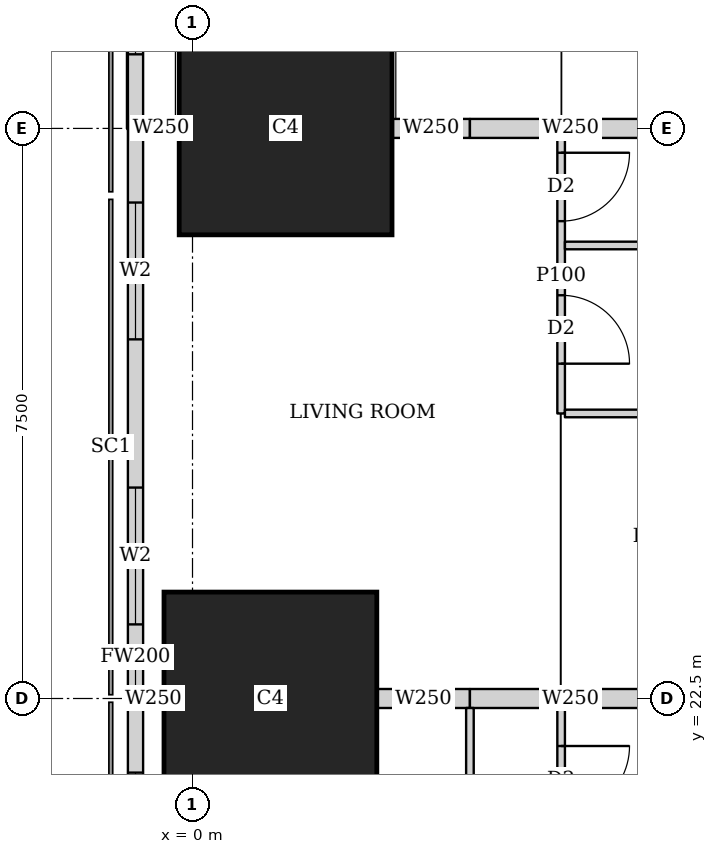
"""IFC4 building model, lengths in metres.
Left out: names, types, materials, properties, quantities, classifications, styles, units other than length and angle.
Written with IfcOpenShell. Run it as: python <this file> out.ifc"""

import sys

from ifc_helpers import new_model, si_unit, direction, frame, frame_2d, origin, origin_2d, place, context, subcontext, project, spatial, rectangle, extrude, element, fill, save


model = new_model("IFC4")
c1 = context("Model", 3, precision=1e-05, world=origin(), true_north=direction((0.0, 1.0)))
c2 = subcontext(c1, "Body", "Model", "MODEL_VIEW")
j1 = project(units=[si_unit("LENGTHUNIT", "METRE"), si_unit("PLANEANGLEUNIT", "RADIAN")], contexts=[c1])
p1 = place(None, origin())
s1 = spatial("IfcSite", under=j1, at=p1, CompositionType="ELEMENT")
p2 = place(p1, origin())
s2 = spatial("IfcBuilding", under=s1, at=p2, CompositionType="ELEMENT")
p3 = place(p2, frame((0.0, 0.0, 53.75)))
s3 = spatial("IfcBuildingStorey", under=s2, at=p3, CompositionType="ELEMENT", Elevation=53.75)
for number, where, z_axis, x_axis in (
    (1, (1.025, 22.5, 0.0), (0.0, 0.0, 1.0), (1.0, 0.0, 0.0)),
    (2, (1.225, 30.0, 0.0), (0.0, 0.0, 1.0), (1.0, 0.0, 0.0)),
):
    element("IfcColumn", number, at=place(p3, frame(where, z_axis=z_axis, x_axis=x_axis)), inside=s3, PredefinedType="COLUMN", context=c2, shape_type="SweptSolid", body=[
        extrude(rectangle(XDim=2.8, YDim=2.8, at=origin_2d()), origin(), (0.0, 0.0, 1.0), 3.75),
    ])
p4 = place(p3, frame((-0.75, 42.837, 0.0), z_axis=(0.0, 0.0, 1.0), x_axis=(0.0, -1.0, 0.0)))
e3 = element("IfcWall", 3, at=p4, inside=s3, PredefinedType="SOLIDWALL", context=c2, shape_type="SweptSolid", body=[
    extrude(rectangle(XDim=40.674, YDim=0.2, at=frame_2d((20.337, 0.0))), origin(), (0.0, 0.0, 1.0), 3.5),
])
p5 = place(p4, frame((1.78, 0.0, 0.9)))
e4 = element("IfcOpeningElement", 4, at=p5, cuts=e3, PredefinedType="OPENING", context=c2, shape_type="SweptSolid", body=[
    extrude(rectangle(XDim=1.8, YDim=1.5, at=frame_2d((0.9, 0.75))), frame((0.0, 0.11, 0.0), z_axis=(0.0, -1.0, 0.0), x_axis=(1.0, 0.0, 0.0)), (0.0, 0.0, 1.0), 0.22),
])
p6 = place(p4, frame((6.312, 0.0, 0.9)))
e5 = element("IfcOpeningElement", 5, at=p6, cuts=e3, PredefinedType="OPENING", context=c2, shape_type="SweptSolid", body=[
    extrude(rectangle(XDim=1.8, YDim=1.5, at=frame_2d((0.9, 0.75))), frame((0.0, 0.11, 0.0), z_axis=(0.0, -1.0, 0.0), x_axis=(1.0, 0.0, 0.0)), (0.0, 0.0, 1.0), 0.22),
])
p7 = place(p4, frame((10.062, 0.0, 0.9)))
e6 = element("IfcOpeningElement", 6, at=p7, cuts=e3, PredefinedType="OPENING", context=c2, shape_type="SweptSolid", body=[
    extrude(rectangle(XDim=1.8, YDim=1.5, at=frame_2d((0.9, 0.75))), frame((0.0, 0.11, 0.0), z_axis=(0.0, -1.0, 0.0), x_axis=(1.0, 0.0, 0.0)), (0.0, 0.0, 1.0), 0.22),
])
p8 = place(p4, frame((13.812, 0.0, 0.9)))
e7 = element("IfcOpeningElement", 7, at=p8, cuts=e3, PredefinedType="OPENING", context=c2, shape_type="SweptSolid", body=[
    extrude(rectangle(XDim=1.8, YDim=1.5, at=frame_2d((0.9, 0.75))), frame((0.0, 0.11, 0.0), z_axis=(0.0, -1.0, 0.0), x_axis=(1.0, 0.0, 0.0)), (0.0, 0.0, 1.0), 0.22),
])
p9 = place(p4, frame((17.562, 0.0, 0.9)))
e8 = element("IfcOpeningElement", 8, at=p9, cuts=e3, PredefinedType="OPENING", context=c2, shape_type="SweptSolid", body=[
    extrude(rectangle(XDim=1.8, YDim=1.5, at=frame_2d((0.9, 0.75))), frame((0.0, 0.11, 0.0), z_axis=(0.0, -1.0, 0.0), x_axis=(1.0, 0.0, 0.0)), (0.0, 0.0, 1.0), 0.22),
])
p10 = place(p4, frame((21.312, 0.0, 0.9)))
e9 = element("IfcOpeningElement", 9, at=p10, cuts=e3, PredefinedType="OPENING", context=c2, shape_type="SweptSolid", body=[
    extrude(rectangle(XDim=1.8, YDim=1.5, at=frame_2d((0.9, 0.75))), frame((0.0, 0.11, 0.0), z_axis=(0.0, -1.0, 0.0), x_axis=(1.0, 0.0, 0.0)), (0.0, 0.0, 1.0), 0.22),
])
p11 = place(p4, frame((25.062, 0.0, 0.9)))
e10 = element("IfcOpeningElement", 10, at=p11, cuts=e3, PredefinedType="OPENING", context=c2, shape_type="SweptSolid", body=[
    extrude(rectangle(XDim=1.8, YDim=1.5, at=frame_2d((0.9, 0.75))), frame((0.0, 0.11, 0.0), z_axis=(0.0, -1.0, 0.0), x_axis=(1.0, 0.0, 0.0)), (0.0, 0.0, 1.0), 0.22),
])
p12 = place(p4, frame((28.812, 0.0, 0.9)))
e11 = element("IfcOpeningElement", 11, at=p12, cuts=e3, PredefinedType="OPENING", context=c2, shape_type="SweptSolid", body=[
    extrude(rectangle(XDim=1.8, YDim=1.5, at=frame_2d((0.9, 0.75))), frame((0.0, 0.11, 0.0), z_axis=(0.0, -1.0, 0.0), x_axis=(1.0, 0.0, 0.0)), (0.0, 0.0, 1.0), 0.22),
])
p13 = place(p4, frame((32.562, 0.0, 0.9)))
e12 = element("IfcOpeningElement", 12, at=p13, cuts=e3, PredefinedType="OPENING", context=c2, shape_type="SweptSolid", body=[
    extrude(rectangle(XDim=1.8, YDim=1.5, at=frame_2d((0.9, 0.75))), frame((0.0, 0.11, 0.0), z_axis=(0.0, -1.0, 0.0), x_axis=(1.0, 0.0, 0.0)), (0.0, 0.0, 1.0), 0.22),
])
p14 = place(p4, frame((37.094, 0.0, 0.9)))
e13 = element("IfcOpeningElement", 13, at=p14, cuts=e3, PredefinedType="OPENING", context=c2, shape_type="SweptSolid", body=[
    extrude(rectangle(XDim=1.8, YDim=1.5, at=frame_2d((0.9, 0.75))), frame((0.0, 0.11, 0.0), z_axis=(0.0, -1.0, 0.0), x_axis=(1.0, 0.0, 0.0)), (0.0, 0.0, 1.0), 0.22),
])
p15 = place(p3, frame((3.65, 15.0, 0.0), z_axis=(0.0, 0.0, 1.0), x_axis=(0.0, 1.0, 0.0)))
e14 = element("IfcWall", 14, at=p15, inside=s3, PredefinedType="PARTITIONING", context=c2, shape_type="SweptSolid", body=[
    extrude(rectangle(XDim=7.375, YDim=0.1, at=frame_2d((3.688, 0.0))), origin(), (0.0, 0.0, 1.0), 3.5),
])
p16 = place(p15, frame((1.45, 0.0, 0.0)))
e15 = element("IfcOpeningElement", 15, at=p16, cuts=e14, PredefinedType="OPENING", context=c2, shape_type="SweptSolid", body=[
    extrude(rectangle(XDim=0.9, YDim=2.1, at=frame_2d((0.45, 1.05))), frame((0.0, 0.06, 0.0), z_axis=(0.0, -1.0, 0.0), x_axis=(1.0, 0.0, 0.0)), (0.0, 0.0, 1.0), 0.12),
])
p17 = place(p15, frame((3.95, 0.0, 0.0)))
e16 = element("IfcOpeningElement", 16, at=p17, cuts=e14, PredefinedType="OPENING", context=c2, shape_type="SweptSolid", body=[
    extrude(rectangle(XDim=0.9, YDim=2.1, at=frame_2d((0.45, 1.05))), frame((0.0, 0.06, 0.0), z_axis=(0.0, -1.0, 0.0), x_axis=(1.0, 0.0, 0.0)), (0.0, 0.0, 1.0), 0.12),
])
p18 = place(p3, frame((4.85, 15.0, 0.0), z_axis=(0.0, 0.0, 1.0), x_axis=(0.0, 1.0, 0.0)))
e17 = element("IfcWall", 17, at=p18, inside=s3, PredefinedType="PARTITIONING", context=c2, shape_type="SweptSolid", body=[
    extrude(rectangle(XDim=7.375, YDim=0.1, at=frame_2d((3.688, 0.0))), origin(), (0.0, 0.0, 1.0), 3.5),
])
p19 = place(p18, frame((0.655, 0.0, 0.0)))
e18 = element("IfcOpeningElement", 18, at=p19, cuts=e17, PredefinedType="OPENING", context=c2, shape_type="SweptSolid", body=[
    extrude(rectangle(XDim=0.9, YDim=2.1, at=frame_2d((0.45, 1.05))), frame((0.0, 0.06, 0.0), z_axis=(0.0, -1.0, 0.0), x_axis=(1.0, 0.0, 0.0)), (0.0, 0.0, 1.0), 0.12),
])
p20 = place(p18, frame((4.1, 0.0, 0.0)))
e19 = element("IfcOpeningElement", 19, at=p20, cuts=e17, PredefinedType="OPENING", context=c2, shape_type="SweptSolid", body=[
    extrude(rectangle(XDim=0.9, YDim=2.1, at=frame_2d((0.45, 1.05))), frame((0.0, 0.06, 0.0), z_axis=(0.0, -1.0, 0.0), x_axis=(1.0, 0.0, 0.0)), (0.0, 0.0, 1.0), 0.12),
])
p21 = place(p18, frame((2.53, 0.0, 0.0)))
e20 = element("IfcOpeningElement", 20, at=p21, cuts=e17, PredefinedType="OPENING", context=c2, shape_type="SweptSolid", body=[
    extrude(rectangle(XDim=0.9, YDim=2.1, at=frame_2d((0.45, 1.05))), frame((0.0, 0.06, 0.0), z_axis=(0.0, -1.0, 0.0), x_axis=(1.0, 0.0, 0.0)), (0.0, 0.0, 1.0), 0.12),
])
p22 = place(p18, frame((5.975, 0.0, 0.0)))
e21 = element("IfcOpeningElement", 21, at=p22, cuts=e17, PredefinedType="OPENING", context=c2, shape_type="SweptSolid", body=[
    extrude(rectangle(XDim=0.9, YDim=2.1, at=frame_2d((0.45, 1.05))), frame((0.0, 0.06, 0.0), z_axis=(0.0, -1.0, 0.0), x_axis=(1.0, 0.0, 0.0)), (0.0, 0.0, 1.0), 0.12),
])
p23 = place(p3, frame((4.85, 26.25, 0.0), z_axis=(0.0, 0.0, 1.0), x_axis=(0.0, 1.0, 0.0)))
e22 = element("IfcWall", 22, at=p23, inside=s3, PredefinedType="PARTITIONING", context=c2, shape_type="SweptSolid", body=[
    extrude(rectangle(XDim=3.625, YDim=0.1, at=frame_2d((1.812, 0.0))), origin(), (0.0, 0.0, 1.0), 3.5),
])
p24 = place(p23, frame((0.655, 0.0, 0.0)))
e23 = element("IfcOpeningElement", 23, at=p24, cuts=e22, PredefinedType="OPENING", context=c2, shape_type="SweptSolid", body=[
    extrude(rectangle(XDim=0.9, YDim=2.1, at=frame_2d((0.45, 1.05))), frame((0.0, 0.06, 0.0), z_axis=(0.0, -1.0, 0.0), x_axis=(1.0, 0.0, 0.0)), (0.0, 0.0, 1.0), 0.12),
])
p25 = place(p23, frame((2.53, 0.0, 0.0)))
e24 = element("IfcOpeningElement", 24, at=p25, cuts=e22, PredefinedType="OPENING", context=c2, shape_type="SweptSolid", body=[
    extrude(rectangle(XDim=0.9, YDim=2.1, at=frame_2d((0.45, 1.05))), frame((0.0, 0.06, 0.0), z_axis=(0.0, -1.0, 0.0), x_axis=(1.0, 0.0, 0.0)), (0.0, 0.0, 1.0), 0.12),
])
for number, where, z_axis, x_axis in (
    (25, (4.9, 26.25, 0.0), (0.0, 0.0, 1.0), (1.0, 0.0, 0.0)),
    (26, (4.9, 28.46, 0.0), (0.0, 0.0, 1.0), (1.0, 0.0, 0.0)),
):
    element("IfcWall", number, at=place(p3, frame(where, z_axis=z_axis, x_axis=x_axis)), inside=s3, PredefinedType="PARTITIONING", context=c2, shape_type="SweptSolid", body=[
        extrude(rectangle(XDim=3.275, YDim=0.1, at=frame_2d((1.638, 0.0))), origin(), (0.0, 0.0, 1.0), 3.5),
    ])
p26 = place(p3, frame((-0.65, 22.5, 0.0), z_axis=(0.0, 0.0, 1.0), x_axis=(1.0, 0.0, 0.0)))
e27 = element("IfcWall", 27, at=p26, inside=s3, PredefinedType="SOLIDWALL", context=c2, shape_type="SweptSolid", body=[
    extrude(rectangle(XDim=0.274, YDim=0.25, at=frame_2d((0.137, 0.0))), origin(), (0.0, 0.0, 1.0), 3.5),
])
p27 = place(p3, frame((2.426, 22.5, 0.0), z_axis=(0.0, 0.0, 1.0), x_axis=(1.0, 0.0, 0.0)))
e28 = element("IfcWall", 28, at=p27, inside=s3, PredefinedType="SOLIDWALL", context=c2, shape_type="SweptSolid", body=[
    extrude(rectangle(XDim=1.224, YDim=0.25, at=frame_2d((0.612, 0.0))), origin(), (0.0, 0.0, 1.0), 3.5),
])
p28 = place(p3, frame((3.65, 22.5, 0.0), z_axis=(0.0, 0.0, 1.0), x_axis=(1.0, 0.0, 0.0)))
e29 = element("IfcWall", 29, at=p28, inside=s3, PredefinedType="SOLIDWALL", context=c2, shape_type="SweptSolid", body=[
    extrude(rectangle(XDim=2.649, YDim=0.25, at=frame_2d((1.325, 0.0))), origin(), (0.0, 0.0, 1.0), 3.5),
])
p29 = place(p3, frame((-0.65, 30.0, 0.0), z_axis=(0.0, 0.0, 1.0), x_axis=(1.0, 0.0, 0.0)))
e30 = element("IfcWall", 30, at=p29, inside=s3, PredefinedType="SOLIDWALL", context=c2, shape_type="SweptSolid", body=[
    extrude(rectangle(XDim=0.474, YDim=0.25, at=frame_2d((0.237, 0.0))), origin(), (0.0, 0.0, 1.0), 3.5),
])
p30 = place(p3, frame((2.626, 30.0, 0.0), z_axis=(0.0, 0.0, 1.0), x_axis=(1.0, 0.0, 0.0)))
e31 = element("IfcWall", 31, at=p30, inside=s3, PredefinedType="SOLIDWALL", context=c2, shape_type="SweptSolid", body=[
    extrude(rectangle(XDim=1.024, YDim=0.25, at=frame_2d((0.512, 0.0))), origin(), (0.0, 0.0, 1.0), 3.5),
])
p31 = place(p3, frame((3.65, 30.0, 0.0), z_axis=(0.0, 0.0, 1.0), x_axis=(1.0, 0.0, 0.0)))
e32 = element("IfcWall", 32, at=p31, inside=s3, PredefinedType="SOLIDWALL", context=c2, shape_type="SweptSolid", body=[
    extrude(rectangle(XDim=2.649, YDim=0.25, at=frame_2d((1.325, 0.0))), origin(), (0.0, 0.0, 1.0), 3.5),
])
p32 = place(p7, origin())
e33 = element("IfcWindow", 33, at=p32, inside=s3, PartitioningType="SINGLE_PANEL", PredefinedType="WINDOW", context=c2, shape_type="SweptSolid", body=[
    extrude(rectangle(XDim=1.8, YDim=1.5, at=frame_2d((0.9, 0.75))), frame((0.0, 0.03, 0.0), z_axis=(0.0, -1.0, 0.0), x_axis=(1.0, 0.0, 0.0)), (0.0, 0.0, 1.0), 0.06),
])
fill(e6, e33)
p33 = place(p8, origin())
e34 = element("IfcWindow", 34, at=p33, inside=s3, PartitioningType="SINGLE_PANEL", PredefinedType="WINDOW", context=c2, shape_type="SweptSolid", body=[
    extrude(rectangle(XDim=1.8, YDim=1.5, at=frame_2d((0.9, 0.75))), frame((0.0, 0.03, 0.0), z_axis=(0.0, -1.0, 0.0), x_axis=(1.0, 0.0, 0.0)), (0.0, 0.0, 1.0), 0.06),
])
fill(e7, e34)
p34 = place(p9, origin())
e35 = element("IfcWindow", 35, at=p34, inside=s3, PartitioningType="SINGLE_PANEL", PredefinedType="WINDOW", context=c2, shape_type="SweptSolid", body=[
    extrude(rectangle(XDim=1.8, YDim=1.5, at=frame_2d((0.9, 0.75))), frame((0.0, 0.03, 0.0), z_axis=(0.0, -1.0, 0.0), x_axis=(1.0, 0.0, 0.0)), (0.0, 0.0, 1.0), 0.06),
])
fill(e8, e35)
p35 = place(p10, origin())
e36 = element("IfcWindow", 36, at=p35, inside=s3, PartitioningType="SINGLE_PANEL", PredefinedType="WINDOW", context=c2, shape_type="SweptSolid", body=[
    extrude(rectangle(XDim=1.8, YDim=1.5, at=frame_2d((0.9, 0.75))), frame((0.0, 0.03, 0.0), z_axis=(0.0, -1.0, 0.0), x_axis=(1.0, 0.0, 0.0)), (0.0, 0.0, 1.0), 0.06),
])
fill(e9, e36)
p36 = place(p22, origin())
e37 = element("IfcDoor", 37, at=p36, inside=s3, OperationType="SINGLE_SWING_LEFT", PredefinedType="DOOR", context=c2, shape_type="SweptSolid", body=[
    extrude(rectangle(XDim=0.9, YDim=2.1, at=frame_2d((0.45, 1.05))), frame((0.0, 0.025, 0.0), z_axis=(0.0, -1.0, 0.0), x_axis=(1.0, 0.0, 0.0)), (0.0, 0.0, 1.0), 0.05),
])
fill(e21, e37)
p37 = place(p24, origin())
e38 = element("IfcDoor", 38, at=p37, inside=s3, OperationType="SINGLE_SWING_RIGHT", PredefinedType="DOOR", context=c2, shape_type="SweptSolid", body=[
    extrude(rectangle(XDim=0.9, YDim=2.1, at=frame_2d((0.45, 1.05))), frame((0.0, 0.025, 0.0), z_axis=(0.0, -1.0, 0.0), x_axis=(1.0, 0.0, 0.0)), (0.0, 0.0, 1.0), 0.05),
])
fill(e23, e38)
p38 = place(p25, origin())
e39 = element("IfcDoor", 39, at=p38, inside=s3, OperationType="SINGLE_SWING_LEFT", PredefinedType="DOOR", context=c2, shape_type="SweptSolid", body=[
    extrude(rectangle(XDim=0.9, YDim=2.1, at=frame_2d((0.45, 1.05))), frame((0.0, 0.025, 0.0), z_axis=(0.0, -1.0, 0.0), x_axis=(1.0, 0.0, 0.0)), (0.0, 0.0, 1.0), 0.05),
])
fill(e24, e39)
save(model, sys.argv[1])
